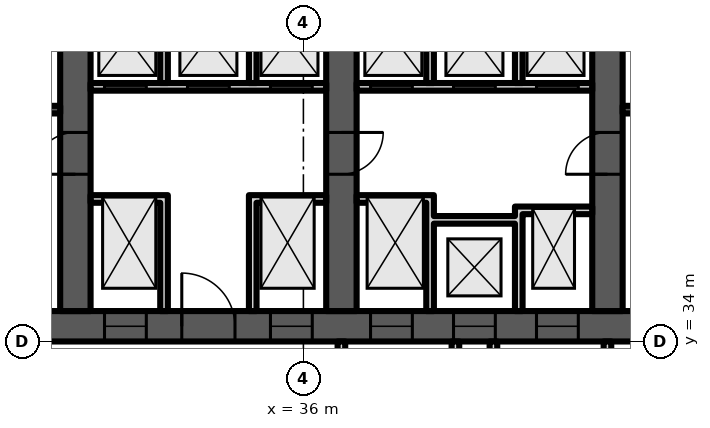
"""IFC4 building model, lengths in metres.
Left out: names, types, materials, properties, quantities, classifications, styles, units other than length and angle.
Written with IfcOpenShell. Run it as: python <this file> out.ifc"""

import sys

from ifc_helpers import new_model, si_unit, direction, frame, frame_2d, origin, place, context, subcontext, project, spatial, polyline, rectangle, outline, extrude, element, fill, save


model = new_model("IFC4")
c1 = context("Model", 3, precision=1e-05, world=origin(), true_north=direction((0.0, 1.0)))
c2 = subcontext(c1, "Body", "Model", "MODEL_VIEW")
j1 = project(units=[si_unit("LENGTHUNIT", "METRE"), si_unit("PLANEANGLEUNIT", "RADIAN")], contexts=[c1])
p1 = place(None, origin())
s1 = spatial("IfcSite", under=j1, at=p1, CompositionType="ELEMENT")
p2 = place(p1, origin())
s2 = spatial("IfcBuilding", under=s1, at=p2, CompositionType="ELEMENT")
p3 = place(p2, frame((0.0, 0.0, 202.3)))
s3 = spatial("IfcBuildingStorey", under=s2, at=p3, CompositionType="ELEMENT", Elevation=202.3)
p4 = place(p3, frame((16.0, 34.4, 0.0), z_axis=(0.0, 0.0, 1.0), x_axis=(1.0, 0.0, 0.0)))
e1 = element("IfcWall", 1, at=p4, inside=s3, PredefinedType="SHEAR", context=c2, shape_type="SweptSolid", body=[
    extrude(rectangle(XDim=42.0, YDim=0.8, at=frame_2d((21.0, 0.0))), origin(), (0.0, 0.0, 1.0), 4.8),
])
p5 = place(p4, frame((3.2, 0.0, 0.0)))
e2 = element("IfcOpeningElement", 2, at=p5, cuts=e1, PredefinedType="OPENING", context=c2, shape_type="SweptSolid", body=[
    extrude(rectangle(XDim=1.0, YDim=2.1, at=frame_2d((0.5, 1.05))), frame((0.0, 0.41, 0.0), z_axis=(0.0, -1.0, 0.0), x_axis=(1.0, 0.0, 0.0)), (0.0, 0.0, 1.0), 0.82),
])
p6 = place(p4, frame((7.65, 0.0, 0.0)))
e3 = element("IfcOpeningElement", 3, at=p6, cuts=e1, PredefinedType="OPENING", context=c2, shape_type="SweptSolid", body=[
    extrude(rectangle(XDim=1.2, YDim=2.1, at=frame_2d((0.6, 1.05))), frame((0.0, 0.41, 0.0), z_axis=(0.0, -1.0, 0.0), x_axis=(1.0, 0.0, 0.0)), (0.0, 0.0, 1.0), 0.82),
])
p7 = place(p4, frame((14.767, 0.0, 0.0)))
e4 = element("IfcOpeningElement", 4, at=p7, cuts=e1, PredefinedType="OPENING", context=c2, shape_type="SweptSolid", body=[
    extrude(rectangle(XDim=1.1, YDim=2.1, at=frame_2d((0.55, 1.05))), frame((0.0, 0.41, 0.0), z_axis=(0.0, -1.0, 0.0), x_axis=(1.0, 0.0, 0.0)), (0.0, 0.0, 1.0), 0.82),
])
p8 = place(p4, frame((19.133, 0.0, 0.0)))
e5 = element("IfcOpeningElement", 5, at=p8, cuts=e1, PredefinedType="OPENING", context=c2, shape_type="SweptSolid", body=[
    extrude(rectangle(XDim=1.1, YDim=2.1, at=frame_2d((0.55, 1.05))), frame((0.0, 0.41, 0.0), z_axis=(0.0, -1.0, 0.0), x_axis=(1.0, 0.0, 0.0)), (0.0, 0.0, 1.0), 0.82),
])
p9 = place(p4, frame((16.8, 0.0, 0.0)))
e6 = element("IfcOpeningElement", 6, at=p9, cuts=e1, PredefinedType="OPENING", context=c2, shape_type="SweptSolid", body=[
    extrude(rectangle(XDim=1.4, YDim=2.1, at=frame_2d((0.7, 1.05))), frame((0.0, 0.41, 0.0), z_axis=(0.0, -1.0, 0.0), x_axis=(1.0, 0.0, 0.0)), (0.0, 0.0, 1.0), 0.82),
])
p10 = place(p4, frame((21.767, 0.0, 0.0)))
e7 = element("IfcOpeningElement", 7, at=p10, cuts=e1, PredefinedType="OPENING", context=c2, shape_type="SweptSolid", body=[
    extrude(rectangle(XDim=1.1, YDim=2.1, at=frame_2d((0.55, 1.05))), frame((0.0, 0.41, 0.0), z_axis=(0.0, -1.0, 0.0), x_axis=(1.0, 0.0, 0.0)), (0.0, 0.0, 1.0), 0.82),
])
p11 = place(p4, frame((23.95, 0.0, 0.0)))
e8 = element("IfcOpeningElement", 8, at=p11, cuts=e1, PredefinedType="OPENING", context=c2, shape_type="SweptSolid", body=[
    extrude(rectangle(XDim=1.1, YDim=2.1, at=frame_2d((0.55, 1.05))), frame((0.0, 0.41, 0.0), z_axis=(0.0, -1.0, 0.0), x_axis=(1.0, 0.0, 0.0)), (0.0, 0.0, 1.0), 0.82),
])
p12 = place(p4, frame((26.133, 0.0, 0.0)))
e9 = element("IfcOpeningElement", 9, at=p12, cuts=e1, PredefinedType="OPENING", context=c2, shape_type="SweptSolid", body=[
    extrude(rectangle(XDim=1.1, YDim=2.1, at=frame_2d((0.55, 1.05))), frame((0.0, 0.41, 0.0), z_axis=(0.0, -1.0, 0.0), x_axis=(1.0, 0.0, 0.0)), (0.0, 0.0, 1.0), 0.82),
])
p13 = place(p4, frame((33.15, 0.0, 0.0)))
e10 = element("IfcOpeningElement", 10, at=p13, cuts=e1, PredefinedType="OPENING", context=c2, shape_type="SweptSolid", body=[
    extrude(rectangle(XDim=1.2, YDim=2.1, at=frame_2d((0.6, 1.05))), frame((0.0, 0.41, 0.0), z_axis=(0.0, -1.0, 0.0), x_axis=(1.0, 0.0, 0.0)), (0.0, 0.0, 1.0), 0.82),
])
p14 = place(p4, frame((37.767, 0.0, 0.0)))
e11 = element("IfcOpeningElement", 11, at=p14, cuts=e1, PredefinedType="OPENING", context=c2, shape_type="SweptSolid", body=[
    extrude(rectangle(XDim=1.4, YDim=2.1, at=frame_2d((0.7, 1.05))), frame((0.0, 0.41, 0.0), z_axis=(0.0, -1.0, 0.0), x_axis=(1.0, 0.0, 0.0)), (0.0, 0.0, 1.0), 0.82),
])
p15 = place(p3, frame((30.0, 34.8, 0.0), z_axis=(0.0, 0.0, 1.0), x_axis=(0.0, 1.0, 0.0)))
e12 = element("IfcWall", 12, at=p15, inside=s3, PredefinedType="SHEAR", context=c2, shape_type="SweptSolid", body=[
    extrude(rectangle(XDim=14.374, YDim=0.8, at=frame_2d((7.187, 0.0))), origin(), (0.0, 0.0, 1.0), 4.8),
])
p16 = place(p15, frame((3.6, 0.0, 0.0)))
e13 = element("IfcOpeningElement", 13, at=p16, cuts=e12, PredefinedType="OPENING", context=c2, shape_type="SweptSolid", body=[
    extrude(rectangle(XDim=1.1, YDim=2.1, at=frame_2d((0.55, 1.05))), frame((0.0, 0.41, 0.0), z_axis=(0.0, -1.0, 0.0), x_axis=(1.0, 0.0, 0.0)), (0.0, 0.0, 1.0), 0.82),
])
p17 = place(p3, frame((37.0, 34.8, 0.0), z_axis=(0.0, 0.0, 1.0), x_axis=(0.0, 1.0, 0.0)))
e14 = element("IfcWall", 14, at=p17, inside=s3, PredefinedType="SHEAR", context=c2, shape_type="SweptSolid", body=[
    extrude(rectangle(XDim=14.987, YDim=0.8, at=frame_2d((7.493, 0.0))), origin(), (0.0, 0.0, 1.0), 4.8),
])
p18 = place(p17, frame((11.312, 0.0, 0.0)))
e15 = element("IfcOpeningElement", 15, at=p18, cuts=e14, PredefinedType="OPENING", context=c2, shape_type="SweptSolid", body=[
    extrude(rectangle(XDim=1.0, YDim=2.1, at=frame_2d((0.5, 1.05))), frame((0.0, 0.41, 0.0), z_axis=(0.0, -1.0, 0.0), x_axis=(1.0, 0.0, 0.0)), (0.0, 0.0, 1.0), 0.82),
])
p19 = place(p17, frame((3.6, 0.0, 0.0)))
e16 = element("IfcOpeningElement", 16, at=p19, cuts=e14, PredefinedType="OPENING", context=c2, shape_type="SweptSolid", body=[
    extrude(rectangle(XDim=1.1, YDim=2.1, at=frame_2d((0.55, 1.05))), frame((0.0, 0.41, 0.0), z_axis=(0.0, -1.0, 0.0), x_axis=(1.0, 0.0, 0.0)), (0.0, 0.0, 1.0), 0.82),
])
p20 = place(p3, frame((44.0, 34.8, 0.0), z_axis=(0.0, 0.0, 1.0), x_axis=(0.0, 1.0, 0.0)))
e17 = element("IfcWall", 17, at=p20, inside=s3, PredefinedType="SHEAR", context=c2, shape_type="SweptSolid", body=[
    extrude(rectangle(XDim=14.374, YDim=0.8, at=frame_2d((7.187, 0.0))), origin(), (0.0, 0.0, 1.0), 4.8),
])
p21 = place(p20, frame((11.312, 0.0, 0.0)))
e18 = element("IfcOpeningElement", 18, at=p21, cuts=e17, PredefinedType="OPENING", context=c2, shape_type="SweptSolid", body=[
    extrude(rectangle(XDim=1.0, YDim=2.1, at=frame_2d((0.5, 1.05))), frame((0.0, 0.41, 0.0), z_axis=(0.0, -1.0, 0.0), x_axis=(1.0, 0.0, 0.0)), (0.0, 0.0, 1.0), 0.82),
])
p22 = place(p20, frame((3.6, 0.0, 0.0)))
e19 = element("IfcOpeningElement", 19, at=p22, cuts=e17, PredefinedType="OPENING", context=c2, shape_type="SweptSolid", body=[
    extrude(rectangle(XDim=1.1, YDim=2.1, at=frame_2d((0.55, 1.05))), frame((0.0, 0.41, 0.0), z_axis=(0.0, -1.0, 0.0), x_axis=(1.0, 0.0, 0.0)), (0.0, 0.0, 1.0), 0.82),
])
p23 = place(p3, frame((23.4, 40.1, 0.0), z_axis=(0.0, 0.0, 1.0), x_axis=(1.0, 0.0, 0.0)))
e20 = element("IfcWall", 20, at=p23, inside=s3, PredefinedType="SHEAR", context=c2, shape_type="SweptSolid", body=[
    extrude(rectangle(XDim=6.2, YDim=0.2, at=frame_2d((3.1, 0.0))), origin(), (0.0, 0.0, 1.0), 4.4),
])
p24 = place(p23, frame((3.525, 0.0, 0.0)))
e21 = element("IfcOpeningElement", 21, at=p24, cuts=e20, PredefinedType="OPENING", context=c2, shape_type="SweptSolid", body=[
    extrude(rectangle(XDim=1.2, YDim=2.1, at=frame_2d((0.6, 1.05))), frame((0.0, 0.11, 0.0), z_axis=(0.0, -1.0, 0.0), x_axis=(1.0, 0.0, 0.0)), (0.0, 0.0, 1.0), 0.22),
])
p25 = place(p23, frame((0.575, 0.0, 0.0)))
e22 = element("IfcOpeningElement", 22, at=p25, cuts=e20, PredefinedType="OPENING", context=c2, shape_type="SweptSolid", body=[
    extrude(rectangle(XDim=0.9, YDim=2.1, at=frame_2d((0.45, 1.05))), frame((0.0, 0.11, 0.0), z_axis=(0.0, -1.0, 0.0), x_axis=(1.0, 0.0, 0.0)), (0.0, 0.0, 1.0), 0.22),
])
p26 = place(p3, frame((30.4, 40.7, 0.0), z_axis=(0.0, 0.0, 1.0), x_axis=(1.0, 0.0, 0.0)))
e23 = element("IfcWall", 23, at=p26, inside=s3, PredefinedType="PARTITIONING", context=c2, shape_type="SweptSolid", body=[
    extrude(rectangle(XDim=6.2, YDim=0.2, at=frame_2d((3.1, 0.0))), origin(), (0.0, 0.0, 1.0), 4.4),
])
p27 = place(p26, frame((0.367, 0.0, 0.0)))
e24 = element("IfcOpeningElement", 24, at=p27, cuts=e23, PredefinedType="OPENING", context=c2, shape_type="SweptSolid", body=[
    extrude(rectangle(XDim=1.1, YDim=2.1, at=frame_2d((0.55, 1.05))), frame((0.0, 0.11, 0.0), z_axis=(0.0, -1.0, 0.0), x_axis=(1.0, 0.0, 0.0)), (0.0, 0.0, 1.0), 0.22),
])
p28 = place(p26, frame((2.55, 0.0, 0.0)))
e25 = element("IfcOpeningElement", 25, at=p28, cuts=e23, PredefinedType="OPENING", context=c2, shape_type="SweptSolid", body=[
    extrude(rectangle(XDim=1.1, YDim=2.1, at=frame_2d((0.55, 1.05))), frame((0.0, 0.11, 0.0), z_axis=(0.0, -1.0, 0.0), x_axis=(1.0, 0.0, 0.0)), (0.0, 0.0, 1.0), 0.22),
])
p29 = place(p26, frame((4.733, 0.0, 0.0)))
e26 = element("IfcOpeningElement", 26, at=p29, cuts=e23, PredefinedType="OPENING", context=c2, shape_type="SweptSolid", body=[
    extrude(rectangle(XDim=1.1, YDim=2.1, at=frame_2d((0.55, 1.05))), frame((0.0, 0.11, 0.0), z_axis=(0.0, -1.0, 0.0), x_axis=(1.0, 0.0, 0.0)), (0.0, 0.0, 1.0), 0.22),
])
p30 = place(p3, frame((0.0, 0.0, -0.0)))
e27 = element("IfcWall", 27, at=p30, inside=s3, PredefinedType="PARTITIONING", context=c2, shape_type="SweptSolid", body=[
    extrude(outline(polyline([(32.233, 37.65), (30.4, 37.65), (30.4, 37.85), (32.233, 37.85), (32.433, 37.85), (32.433, 34.8), (32.233, 34.8), (32.233, 37.65)])), origin(), (0.0, 0.0, 1.0), 4.4),
])
p31 = place(p3, frame((0.0, 0.0, -0.0)))
e28 = element("IfcWall", 28, at=p31, inside=s3, PredefinedType="PARTITIONING", context=c2, shape_type="SweptSolid", body=[
    extrude(outline(polyline([(34.567, 37.85), (34.767, 37.85), (36.6, 37.85), (36.6, 37.65), (34.767, 37.65), (34.767, 34.8), (34.567, 34.8), (34.567, 37.85)])), origin(), (0.0, 0.0, 1.0), 4.4),
])
p32 = place(p3, frame((0.0, 0.0, -0.0)))
e29 = element("IfcWall", 29, at=p32, inside=s3, PredefinedType="PARTITIONING", context=c2, shape_type="SweptSolid", body=[
    extrude(outline(polyline([(32.433, 40.8), (32.233, 40.8), (32.233, 43.8), (30.4, 43.8), (30.4, 44.0), (36.6, 44.0), (36.6, 43.8), (34.767, 43.8), (34.767, 40.8), (34.567, 40.8), (34.567, 43.8), (32.433, 43.8), (32.433, 40.8)])), origin(), (0.0, 0.0, 1.0), 4.4),
])
p33 = place(p3, frame((37.4, 40.7, 0.0), z_axis=(0.0, 0.0, 1.0), x_axis=(1.0, 0.0, 0.0)))
e30 = element("IfcWall", 30, at=p33, inside=s3, PredefinedType="PARTITIONING", context=c2, shape_type="SweptSolid", body=[
    extrude(rectangle(XDim=6.2, YDim=0.2, at=frame_2d((3.1, 0.0))), origin(), (0.0, 0.0, 1.0), 4.4),
])
p34 = place(p33, frame((0.367, 0.0, 0.0)))
e31 = element("IfcOpeningElement", 31, at=p34, cuts=e30, PredefinedType="OPENING", context=c2, shape_type="SweptSolid", body=[
    extrude(rectangle(XDim=1.1, YDim=2.1, at=frame_2d((0.55, 1.05))), frame((0.0, 0.11, 0.0), z_axis=(0.0, -1.0, 0.0), x_axis=(1.0, 0.0, 0.0)), (0.0, 0.0, 1.0), 0.22),
])
p35 = place(p33, frame((2.55, 0.0, 0.0)))
e32 = element("IfcOpeningElement", 32, at=p35, cuts=e30, PredefinedType="OPENING", context=c2, shape_type="SweptSolid", body=[
    extrude(rectangle(XDim=1.1, YDim=2.1, at=frame_2d((0.55, 1.05))), frame((0.0, 0.11, 0.0), z_axis=(0.0, -1.0, 0.0), x_axis=(1.0, 0.0, 0.0)), (0.0, 0.0, 1.0), 0.22),
])
p36 = place(p33, frame((4.733, 0.0, 0.0)))
e33 = element("IfcOpeningElement", 33, at=p36, cuts=e30, PredefinedType="OPENING", context=c2, shape_type="SweptSolid", body=[
    extrude(rectangle(XDim=1.1, YDim=2.1, at=frame_2d((0.55, 1.05))), frame((0.0, 0.11, 0.0), z_axis=(0.0, -1.0, 0.0), x_axis=(1.0, 0.0, 0.0)), (0.0, 0.0, 1.0), 0.22),
])
p37 = place(p3, frame((0.0, 0.0, -0.0)))
e34 = element("IfcWall", 34, at=p37, inside=s3, PredefinedType="PARTITIONING", context=c2, shape_type="SweptSolid", body=[
    extrude(outline(polyline([(41.567, 37.1), (39.433, 37.1), (39.433, 34.8), (39.233, 34.8), (39.233, 37.65), (37.4, 37.65), (37.4, 37.85), (39.233, 37.85), (39.433, 37.85), (39.433, 37.3), (41.567, 37.3), (41.567, 37.55), (41.767, 37.55), (43.6, 37.55), (43.6, 37.35), (41.767, 37.35), (41.767, 34.8), (41.567, 34.8), (41.567, 37.1)])), origin(), (0.0, 0.0, 1.0), 4.4),
])
p38 = place(p3, frame((0.0, 0.0, -0.0)))
e35 = element("IfcWall", 35, at=p38, inside=s3, PredefinedType="PARTITIONING", context=c2, shape_type="SweptSolid", body=[
    extrude(outline(polyline([(39.433, 40.8), (39.233, 40.8), (39.233, 43.8), (37.4, 43.8), (37.4, 44.0), (43.6, 44.0), (43.6, 43.8), (41.767, 43.8), (41.767, 40.8), (41.567, 40.8), (41.567, 43.8), (39.433, 43.8), (39.433, 40.8)])), origin(), (0.0, 0.0, 1.0), 4.4),
])
p39 = place(p3, frame((44.4, 40.1, 0.0), z_axis=(0.0, 0.0, 1.0), x_axis=(1.0, 0.0, 0.0)))
e36 = element("IfcWall", 36, at=p39, inside=s3, PredefinedType="SHEAR", context=c2, shape_type="SweptSolid", body=[
    extrude(rectangle(XDim=6.2, YDim=0.2, at=frame_2d((3.1, 0.0))), origin(), (0.0, 0.0, 1.0), 4.4),
])
p40 = place(p39, frame((3.525, 0.0, 0.0)))
e37 = element("IfcOpeningElement", 37, at=p40, cuts=e36, PredefinedType="OPENING", context=c2, shape_type="SweptSolid", body=[
    extrude(rectangle(XDim=1.2, YDim=2.1, at=frame_2d((0.6, 1.05))), frame((0.0, 0.11, 0.0), z_axis=(0.0, -1.0, 0.0), x_axis=(1.0, 0.0, 0.0)), (0.0, 0.0, 1.0), 0.22),
])
p41 = place(p39, frame((0.575, 0.0, 0.0)))
e38 = element("IfcOpeningElement", 38, at=p41, cuts=e36, PredefinedType="OPENING", context=c2, shape_type="SweptSolid", body=[
    extrude(rectangle(XDim=0.9, YDim=2.1, at=frame_2d((0.45, 1.05))), frame((0.0, 0.11, 0.0), z_axis=(0.0, -1.0, 0.0), x_axis=(1.0, 0.0, 0.0)), (0.0, 0.0, 1.0), 0.22),
])
p42 = place(p3, frame((37.0, 30.5, 0.0), z_axis=(0.0, 0.0, 1.0), x_axis=(0.0, 1.0, 0.0)))
e39 = element("IfcWall", 39, at=p42, inside=s3, PredefinedType="PARTITIONING", context=c2, shape_type="SweptSolid", body=[
    extrude(rectangle(XDim=3.5, YDim=0.2, at=frame_2d((1.75, 0.0))), origin(), (0.0, 0.0, 1.0), 4.4),
])
p43 = place(p42, frame((1.2, 0.0, 0.0)))
e40 = element("IfcOpeningElement", 40, at=p43, cuts=e39, PredefinedType="OPENING", context=c2, shape_type="SweptSolid", body=[
    extrude(rectangle(XDim=1.1, YDim=2.1, at=frame_2d((0.55, 1.05))), frame((0.0, 0.11, 0.0), z_axis=(0.0, -1.0, 0.0), x_axis=(1.0, 0.0, 0.0)), (0.0, 0.0, 1.0), 0.22),
])
for number, where, z_axis, x_axis in (
    (41, (40.0, 30.5, 0.0), (0.0, 0.0, 1.0), (0.0, 1.0, 0.0)),
    (42, (41.0, 30.5, 0.0), (0.0, 0.0, 1.0), (0.0, 1.0, 0.0)),
):
    element("IfcWall", number, at=place(p3, frame(where, z_axis=z_axis, x_axis=x_axis)), inside=s3, PredefinedType="PARTITIONING", context=c2, shape_type="SweptSolid", body=[
        extrude(rectangle(XDim=3.5, YDim=0.2, at=frame_2d((1.75, 0.0))), origin(), (0.0, 0.0, 1.0), 4.4),
    ])
p44 = place(p3, frame((44.0, 30.5, 0.0), z_axis=(0.0, 0.0, 1.0), x_axis=(0.0, 1.0, 0.0)))
e43 = element("IfcWall", 43, at=p44, inside=s3, PredefinedType="PARTITIONING", context=c2, shape_type="SweptSolid", body=[
    extrude(rectangle(XDim=3.5, YDim=0.2, at=frame_2d((1.75, 0.0))), origin(), (0.0, 0.0, 1.0), 4.4),
])
p45 = place(p44, frame((1.2, 0.0, 0.0)))
e44 = element("IfcOpeningElement", 44, at=p45, cuts=e43, PredefinedType="OPENING", context=c2, shape_type="SweptSolid", body=[
    extrude(rectangle(XDim=1.1, YDim=2.1, at=frame_2d((0.55, 1.05))), frame((0.0, 0.11, 0.0), z_axis=(0.0, -1.0, 0.0), x_axis=(1.0, 0.0, 0.0)), (0.0, 0.0, 1.0), 0.22),
])
p46 = place(p7, origin())
e45 = element("IfcDoor", 45, at=p46, inside=s3, OperationType="DOUBLE_DOOR_SLIDING", PredefinedType="DOOR", context=c2, shape_type="SweptSolid", body=[
    extrude(rectangle(XDim=1.1, YDim=2.1, at=frame_2d((0.55, 1.05))), frame((0.0, 0.025, 0.0), z_axis=(0.0, -1.0, 0.0), x_axis=(1.0, 0.0, 0.0)), (0.0, 0.0, 1.0), 0.05),
])
fill(e4, e45)
p47 = place(p8, origin())
e46 = element("IfcDoor", 46, at=p47, inside=s3, OperationType="DOUBLE_DOOR_SLIDING", PredefinedType="DOOR", context=c2, shape_type="SweptSolid", body=[
    extrude(rectangle(XDim=1.1, YDim=2.1, at=frame_2d((0.55, 1.05))), frame((0.0, 0.025, 0.0), z_axis=(0.0, -1.0, 0.0), x_axis=(1.0, 0.0, 0.0)), (0.0, 0.0, 1.0), 0.05),
])
fill(e5, e46)
p48 = place(p9, origin())
e47 = element("IfcDoor", 47, at=p48, inside=s3, OperationType="DOUBLE_DOOR_SINGLE_SWING", PredefinedType="DOOR", context=c2, shape_type="SweptSolid", body=[
    extrude(rectangle(XDim=1.4, YDim=2.1, at=frame_2d((0.7, 1.05))), frame((0.0, 0.025, 0.0), z_axis=(0.0, -1.0, 0.0), x_axis=(1.0, 0.0, 0.0)), (0.0, 0.0, 1.0), 0.05),
])
fill(e6, e47)
p49 = place(p27, origin())
e48 = element("IfcDoor", 48, at=p49, inside=s3, OperationType="DOUBLE_DOOR_SLIDING", PredefinedType="DOOR", context=c2, shape_type="SweptSolid", body=[
    extrude(rectangle(XDim=1.1, YDim=2.1, at=frame_2d((0.55, 1.05))), frame((0.0, 0.025, 0.0), z_axis=(0.0, -1.0, 0.0), x_axis=(1.0, 0.0, 0.0)), (0.0, 0.0, 1.0), 0.05),
])
fill(e24, e48)
p50 = place(p28, origin())
e49 = element("IfcDoor", 49, at=p50, inside=s3, OperationType="DOUBLE_DOOR_SLIDING", PredefinedType="DOOR", context=c2, shape_type="SweptSolid", body=[
    extrude(rectangle(XDim=1.1, YDim=2.1, at=frame_2d((0.55, 1.05))), frame((0.0, 0.025, 0.0), z_axis=(0.0, -1.0, 0.0), x_axis=(1.0, 0.0, 0.0)), (0.0, 0.0, 1.0), 0.05),
])
fill(e25, e49)
p51 = place(p29, origin())
e50 = element("IfcDoor", 50, at=p51, inside=s3, OperationType="DOUBLE_DOOR_SLIDING", PredefinedType="DOOR", context=c2, shape_type="SweptSolid", body=[
    extrude(rectangle(XDim=1.1, YDim=2.1, at=frame_2d((0.55, 1.05))), frame((0.0, 0.025, 0.0), z_axis=(0.0, -1.0, 0.0), x_axis=(1.0, 0.0, 0.0)), (0.0, 0.0, 1.0), 0.05),
])
fill(e26, e50)
p52 = place(p10, origin())
e51 = element("IfcDoor", 51, at=p52, inside=s3, OperationType="DOUBLE_DOOR_SLIDING", PredefinedType="DOOR", context=c2, shape_type="SweptSolid", body=[
    extrude(rectangle(XDim=1.1, YDim=2.1, at=frame_2d((0.55, 1.05))), frame((0.0, 0.025, 0.0), z_axis=(0.0, -1.0, 0.0), x_axis=(1.0, 0.0, 0.0)), (0.0, 0.0, 1.0), 0.05),
])
fill(e7, e51)
p53 = place(p11, origin())
e52 = element("IfcDoor", 52, at=p53, inside=s3, OperationType="DOUBLE_DOOR_SLIDING", PredefinedType="DOOR", context=c2, shape_type="SweptSolid", body=[
    extrude(rectangle(XDim=1.1, YDim=2.1, at=frame_2d((0.55, 1.05))), frame((0.0, 0.025, 0.0), z_axis=(0.0, -1.0, 0.0), x_axis=(1.0, 0.0, 0.0)), (0.0, 0.0, 1.0), 0.05),
])
fill(e8, e52)
p54 = place(p12, origin())
e53 = element("IfcDoor", 53, at=p54, inside=s3, OperationType="DOUBLE_DOOR_SLIDING", PredefinedType="DOOR", context=c2, shape_type="SweptSolid", body=[
    extrude(rectangle(XDim=1.1, YDim=2.1, at=frame_2d((0.55, 1.05))), frame((0.0, 0.025, 0.0), z_axis=(0.0, -1.0, 0.0), x_axis=(1.0, 0.0, 0.0)), (0.0, 0.0, 1.0), 0.05),
])
fill(e9, e53)
p55 = place(p34, origin())
e54 = element("IfcDoor", 54, at=p55, inside=s3, OperationType="DOUBLE_DOOR_SLIDING", PredefinedType="DOOR", context=c2, shape_type="SweptSolid", body=[
    extrude(rectangle(XDim=1.1, YDim=2.1, at=frame_2d((0.55, 1.05))), frame((0.0, 0.025, 0.0), z_axis=(0.0, -1.0, 0.0), x_axis=(1.0, 0.0, 0.0)), (0.0, 0.0, 1.0), 0.05),
])
fill(e31, e54)
p56 = place(p35, origin())
e55 = element("IfcDoor", 55, at=p56, inside=s3, OperationType="DOUBLE_DOOR_SLIDING", PredefinedType="DOOR", context=c2, shape_type="SweptSolid", body=[
    extrude(rectangle(XDim=1.1, YDim=2.1, at=frame_2d((0.55, 1.05))), frame((0.0, 0.025, 0.0), z_axis=(0.0, -1.0, 0.0), x_axis=(1.0, 0.0, 0.0)), (0.0, 0.0, 1.0), 0.05),
])
fill(e32, e55)
p57 = place(p36, origin())
e56 = element("IfcDoor", 56, at=p57, inside=s3, OperationType="DOUBLE_DOOR_SLIDING", PredefinedType="DOOR", context=c2, shape_type="SweptSolid", body=[
    extrude(rectangle(XDim=1.1, YDim=2.1, at=frame_2d((0.55, 1.05))), frame((0.0, 0.025, 0.0), z_axis=(0.0, -1.0, 0.0), x_axis=(1.0, 0.0, 0.0)), (0.0, 0.0, 1.0), 0.05),
])
fill(e33, e56)
p58 = place(p16, origin())
e57 = element("IfcDoor", 57, at=p58, inside=s3, OperationType="SINGLE_SWING_LEFT", PredefinedType="DOOR", context=c2, shape_type="SweptSolid", body=[
    extrude(rectangle(XDim=1.1, YDim=2.1, at=frame_2d((0.55, 1.05))), frame((0.0, 0.025, 0.0), z_axis=(0.0, -1.0, 0.0), x_axis=(1.0, 0.0, 0.0)), (0.0, 0.0, 1.0), 0.05),
])
fill(e13, e57)
p59 = place(p19, origin())
e58 = element("IfcDoor", 58, at=p59, inside=s3, OperationType="SINGLE_SWING_RIGHT", PredefinedType="DOOR", context=c2, shape_type="SweptSolid", body=[
    extrude(rectangle(XDim=1.1, YDim=2.1, at=frame_2d((0.55, 1.05))), frame((0.0, 0.025, 0.0), z_axis=(0.0, -1.0, 0.0), x_axis=(1.0, 0.0, 0.0)), (0.0, 0.0, 1.0), 0.05),
])
fill(e16, e58)
p60 = place(p22, origin())
e59 = element("IfcDoor", 59, at=p60, inside=s3, OperationType="SINGLE_SWING_LEFT", PredefinedType="DOOR", context=c2, shape_type="SweptSolid", body=[
    extrude(rectangle(XDim=1.1, YDim=2.1, at=frame_2d((0.55, 1.05))), frame((0.0, 0.025, 0.0), z_axis=(0.0, -1.0, 0.0), x_axis=(1.0, 0.0, 0.0)), (0.0, 0.0, 1.0), 0.05),
])
fill(e19, e59)
save(model, sys.argv[1])
